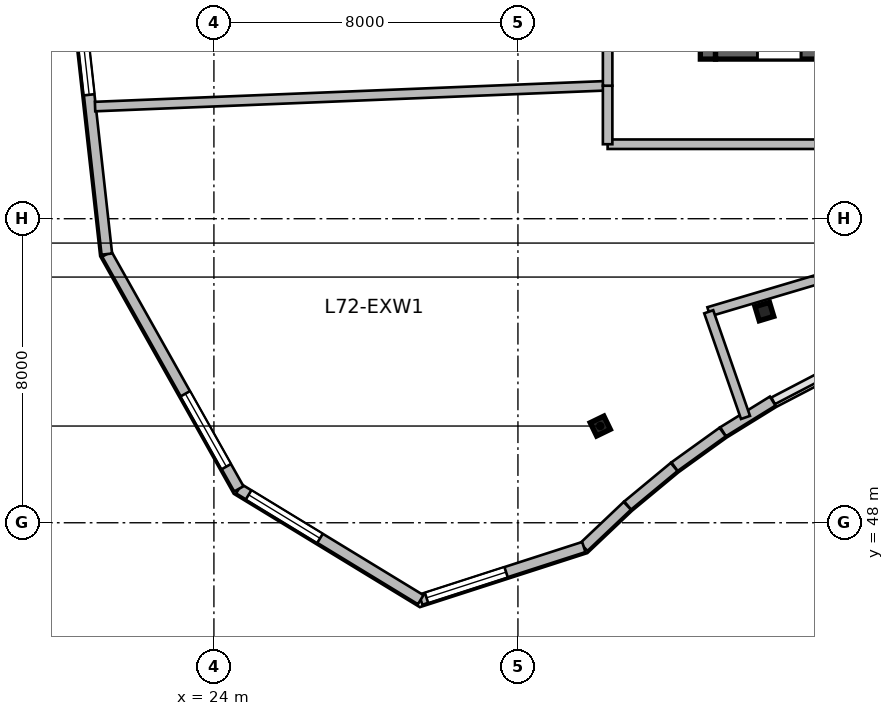
"""IFC4 building model, lengths in metres.
Left out: names, types, materials, properties, quantities, classifications, styles, units other than length and angle.
Written with IfcOpenShell. Run it as: python <this file> out.ifc"""

import sys

from ifc_helpers import new_model, si_unit, direction, frame, frame_2d, origin, origin_2d, place, context, subcontext, project, spatial, rectangle, i_section, extrude, source, transform, mapped, element, fill, save


model = new_model("IFC4")
c1 = context("Model", 3, precision=1e-05, world=origin(), true_north=direction((0.0, 1.0)))
c2 = subcontext(c1, "Body", "Model", "MODEL_VIEW")
j1 = project(units=[si_unit("LENGTHUNIT", "METRE"), si_unit("PLANEANGLEUNIT", "RADIAN")], contexts=[c1])
p1 = place(None, origin())
s1 = spatial("IfcSite", under=j1, at=p1, CompositionType="ELEMENT")
p2 = place(p1, origin())
s2 = spatial("IfcBuilding", under=s1, at=p2, CompositionType="ELEMENT")
p3 = place(p2, frame((0.0, 0.0, 295.2)))
s3 = spatial("IfcBuildingStorey", under=s2, at=p3, CompositionType="ELEMENT", Elevation=295.2)
m1 = source(origin(), c2, "Body", "SweptSolid", [
    extrude(rectangle(XDim=12.0, YDim=0.4, at=frame_2d((6.0, 0.0))), origin(), (0.0, 0.0, 1.0), 3.9),
])
p4 = place(p3, frame((37.0, 60.2, 0.0), z_axis=(0.0, 0.0, 1.0), x_axis=(0.0, 1.0, 0.0)))
e1 = element("IfcWall", 1, at=p4, inside=s3, PredefinedType="SHEAR", context=c2, shape_type="MappedRepresentation", body=[
    mapped(m1, transform((0.0, 0.0, 0.0), scale=1.0)),
])
m2 = source(origin(), c2, "Body", "SweptSolid", [
    extrude(rectangle(XDim=21.6, YDim=0.4, at=frame_2d((10.8, 0.0))), origin(), (0.0, 0.0, 1.0), 3.9),
])
p5 = place(p3, frame((37.2, 60.4, 0.0), z_axis=(0.0, 0.0, 1.0), x_axis=(1.0, 0.0, 0.0)))
e2 = element("IfcWall", 2, at=p5, inside=s3, PredefinedType="SHEAR", context=c2, shape_type="MappedRepresentation", body=[
    mapped(m2, transform((0.0, 0.0, 0.0), scale=1.0)),
])
p6 = place(p5, frame((1.1, 0.0, 0.0)))
e3 = element("IfcOpeningElement", 3, at=p6, cuts=e2, PredefinedType="OPENING", context=c2, shape_type="SweptSolid", body=[
    extrude(rectangle(XDim=1.15, YDim=2.15, at=frame_2d((0.575, 1.075))), frame((0.0, 0.21, 0.0), z_axis=(0.0, -1.0, 0.0), x_axis=(1.0, 0.0, 0.0)), (0.0, 0.0, 1.0), 0.42),
])
p7 = place(p5, frame((19.5, 0.0, 0.0)))
e4 = element("IfcOpeningElement", 4, at=p7, cuts=e2, PredefinedType="OPENING", context=c2, shape_type="SweptSolid", body=[
    extrude(rectangle(XDim=0.9, YDim=2.1, at=frame_2d((0.45, 1.05))), frame((0.0, 0.21, 0.0), z_axis=(0.0, -1.0, 0.0), x_axis=(1.0, 0.0, 0.0)), (0.0, 0.0, 1.0), 0.42),
])
p8 = place(p5, frame((12.02, 0.0, 0.0)))
e5 = element("IfcOpeningElement", 5, at=p8, cuts=e2, PredefinedType="OPENING", context=c2, shape_type="SweptSolid", body=[
    extrude(rectangle(XDim=1.6, YDim=2.15, at=frame_2d((0.8, 1.075))), frame((0.0, 0.21, 0.0), z_axis=(0.0, -1.0, 0.0), x_axis=(1.0, 0.0, 0.0)), (0.0, 0.0, 1.0), 0.42),
])
m3 = source(origin(), c2, "Body", "SweptSolid", [
    extrude(i_section(OverallWidth=0.399, OverallDepth=0.387, WebThickness=0.021, FlangeThickness=0.033, at=origin_2d()), origin(), (0.0, 0.0, 1.0), 3.9),
])
for number, where, z_axis, x_axis in (
    (6, (34.166, 50.545, 0.0), (0.0, 0.0, 1.0), (-0.436, 0.9, 0.0)),
    (7, (38.485, 53.558, 0.0), (0.0, 0.0, 1.0), (-0.289, 0.957, 0.0)),
):
    element("IfcColumn", number, at=place(p3, frame(where, z_axis=z_axis, x_axis=x_axis)), inside=s3, PredefinedType="COLUMN", context=c2, shape_type="MappedRepresentation", body=[
        mapped(m3, transform((0.0, 0.0, 0.0), scale=1.0)),
    ])
m4 = source(origin(), c2, "Body", "SweptSolid", [
    extrude(rectangle(XDim=1.535, YDim=0.28, at=frame_2d((0.768, 0.0))), origin(), (0.0, 0.0, 1.0), 3.64),
])
p9 = place(p3, frame((38.704, 51.201, 0.0), z_axis=(0.0, 0.0, 1.0), x_axis=(-0.850756173541, -0.525560589449, 0.0)))
e8 = element("IfcWall", 8, at=p9, inside=s3, PredefinedType="SOLIDWALL", context=c2, shape_type="MappedRepresentation", body=[
    mapped(m4, transform((0.0, 0.0, 0.0), scale=1.0)),
])
m5 = source(origin(), c2, "Body", "SweptSolid", [
    extrude(rectangle(XDim=1.561, YDim=0.28, at=frame_2d((0.781, 0.0))), origin(), (0.0, 0.0, 1.0), 3.64),
])
p10 = place(p3, frame((37.387, 50.387, 0.0), z_axis=(0.0, 0.0, 1.0), x_axis=(-0.81154027425, -0.584296485758, 0.0)))
e9 = element("IfcWall", 9, at=p10, inside=s3, PredefinedType="SOLIDWALL", context=c2, shape_type="MappedRepresentation", body=[
    mapped(m5, transform((0.0, 0.0, 0.0), scale=1.0)),
])
m6 = source(origin(), c2, "Body", "SweptSolid", [
    extrude(rectangle(XDim=1.589, YDim=0.28, at=frame_2d((0.794, 0.0))), origin(), (0.0, 0.0, 1.0), 3.64),
])
p11 = place(p3, frame((36.11, 49.468, 0.0), z_axis=(0.0, 0.0, 1.0), x_axis=(-0.769805836273, -0.63827813251, 0.0)))
e10 = element("IfcWall", 10, at=p11, inside=s3, PredefinedType="SOLIDWALL", context=c2, shape_type="MappedRepresentation", body=[
    mapped(m6, transform((0.0, 0.0, 0.0), scale=1.0)),
])
m7 = source(origin(), c2, "Body", "SweptSolid", [
    extrude(rectangle(XDim=1.577, YDim=0.28, at=frame_2d((0.789, 0.0))), origin(), (0.0, 0.0, 1.0), 3.64),
])
p12 = place(p3, frame((34.878, 48.446, 0.0), z_axis=(0.0, 0.0, 1.0), x_axis=(-0.726119464467, -0.687568558998, 0.0)))
e11 = element("IfcWall", 11, at=p12, inside=s3, PredefinedType="SOLIDWALL", context=c2, shape_type="MappedRepresentation", body=[
    mapped(m7, transform((0.0, 0.0, 0.0), scale=1.0)),
])
m8 = source(origin(), c2, "Body", "SweptSolid", [
    extrude(rectangle(XDim=4.509, YDim=0.28, at=frame_2d((2.255, 0.0))), origin(), (0.0, 0.0, 1.0), 3.64),
])
p13 = place(p3, frame((33.733, 47.361, 0.0), z_axis=(0.0, 0.0, 1.0), x_axis=(-0.95162949292, -0.307247958828, 0.0)))
e12 = element("IfcWall", 12, at=p13, inside=s3, PredefinedType="SOLIDWALL", context=c2, shape_type="MappedRepresentation", body=[
    mapped(m8, transform((0.0, 0.0, 0.0), scale=1.0)),
])
p14 = place(p13, frame((2.149, 0.0, 0.95)))
e13 = element("IfcOpeningElement", 13, at=p14, cuts=e12, PredefinedType="OPENING", context=c2, shape_type="SweptSolid", body=[
    extrude(rectangle(XDim=2.2, YDim=2.1, at=frame_2d((1.1, 1.05))), frame((0.0, 0.15, 0.0), z_axis=(0.0, -1.0, 0.0), x_axis=(1.0, 0.0, 0.0)), (0.0, 0.0, 1.0), 0.3),
])
m9 = source(origin(), c2, "Body", "SweptSolid", [
    extrude(rectangle(XDim=5.604, YDim=0.28, at=frame_2d((2.802, 0.0))), origin(), (0.0, 0.0, 1.0), 3.64),
])
p15 = place(p3, frame((29.442, 45.976, 0.0), z_axis=(0.0, 0.0, 1.0), x_axis=(-0.854002492971, 0.520268913158, 0.0)))
e14 = element("IfcWall", 14, at=p15, inside=s3, PredefinedType="SOLIDWALL", context=c2, shape_type="MappedRepresentation", body=[
    mapped(m9, transform((0.0, 0.0, 0.0), scale=1.0)),
])
p16 = place(p15, frame((3.103, 0.0, 0.95)))
e15 = element("IfcOpeningElement", 15, at=p16, cuts=e14, PredefinedType="OPENING", context=c2, shape_type="SweptSolid", body=[
    extrude(rectangle(XDim=2.2, YDim=2.1, at=frame_2d((1.1, 1.05))), frame((0.0, 0.15, 0.0), z_axis=(0.0, -1.0, 0.0), x_axis=(1.0, 0.0, 0.0)), (0.0, 0.0, 1.0), 0.3),
])
m10 = source(origin(), c2, "Body", "SweptSolid", [
    extrude(rectangle(XDim=7.087, YDim=0.28, at=frame_2d((3.543, 0.0))), origin(), (0.0, 0.0, 1.0), 3.64),
])
p17 = place(p3, frame((24.656, 48.892, 0.0), z_axis=(0.0, 0.0, 1.0), x_axis=(-0.490158199368, 0.871633489256, 0.0)))
e16 = element("IfcWall", 16, at=p17, inside=s3, PredefinedType="SOLIDWALL", context=c2, shape_type="MappedRepresentation", body=[
    mapped(m10, transform((0.0, 0.0, 0.0), scale=1.0)),
])
p18 = place(p17, frame((0.672, 0.0, 0.95)))
e17 = element("IfcOpeningElement", 17, at=p18, cuts=e16, PredefinedType="OPENING", context=c2, shape_type="SweptSolid", body=[
    extrude(rectangle(XDim=2.2, YDim=2.1, at=frame_2d((1.1, 1.05))), frame((0.0, 0.15, 0.0), z_axis=(0.0, -1.0, 0.0), x_axis=(1.0, 0.0, 0.0)), (0.0, 0.0, 1.0), 0.3),
])
m11 = source(origin(), c2, "Body", "SweptSolid", [
    extrude(rectangle(XDim=7.09, YDim=0.28, at=frame_2d((3.545, 0.0))), origin(), (0.0, 0.0, 1.0), 3.64),
])
p19 = place(p3, frame((21.182, 55.069, 0.0), z_axis=(0.0, 0.0, 1.0), x_axis=(-0.110159396922, 0.993913933532, 0.0)))
e18 = element("IfcWall", 18, at=p19, inside=s3, PredefinedType="SOLIDWALL", context=c2, shape_type="MappedRepresentation", body=[
    mapped(m11, transform((0.0, 0.0, 0.0), scale=1.0)),
])
p20 = place(p19, frame((4.217, 0.0, 0.95)))
e19 = element("IfcOpeningElement", 19, at=p20, cuts=e18, PredefinedType="OPENING", context=c2, shape_type="SweptSolid", body=[
    extrude(rectangle(XDim=2.2, YDim=2.1, at=frame_2d((1.1, 1.05))), frame((0.0, 0.15, 0.0), z_axis=(0.0, -1.0, 0.0), x_axis=(1.0, 0.0, 0.0)), (0.0, 0.0, 1.0), 0.3),
])
m12 = source(origin(), c2, "Body", "SweptSolid", [
    extrude(rectangle(XDim=11.454, YDim=0.25, at=frame_2d((5.727, 0.0))), origin(), (0.0, 0.0, 1.0), 3.314),
])
p21 = place(p3, frame((37.021, 53.552, 0.0), z_axis=(0.0, 0.0, 1.0), x_axis=(0.958594874645, 0.284773359541, 0.0)))
e20 = element("IfcWall", 20, at=p21, inside=s3, PredefinedType="PARTITIONING", context=c2, shape_type="MappedRepresentation", body=[
    mapped(m12, transform((0.0, 0.0, 0.0), scale=1.0)),
])
p22 = place(p21, frame((4.727, 0.0, 0.0)))
e21 = element("IfcOpeningElement", 21, at=p22, cuts=e20, PredefinedType="OPENING", context=c2, shape_type="SweptSolid", body=[
    extrude(rectangle(XDim=1.1, YDim=2.15, at=frame_2d((0.55, 1.075))), frame((0.0, 0.135, 0.0), z_axis=(0.0, -1.0, 0.0), x_axis=(1.0, 0.0, 0.0)), (0.0, 0.0, 1.0), 0.27),
])
m13 = source(origin(), c2, "Body", "SweptSolid", [
    extrude(rectangle(XDim=2.944, YDim=0.25, at=frame_2d((1.472, 0.0))), origin(), (0.0, 0.0, 1.0), 3.64),
])
p23 = place(p3, frame((37.988, 50.771, 0.0), z_axis=(0.0, 0.0, 1.0), x_axis=(-0.328565655286, 0.944481132774, 0.0)))
e22 = element("IfcWall", 22, at=p23, inside=s3, PredefinedType="PARTITIONING", context=c2, shape_type="MappedRepresentation", body=[
    mapped(m13, transform((0.0, 0.0, 0.0), scale=1.0)),
])
m14 = source(origin(), c2, "Body", "SweptSolid", [
    extrude(rectangle(XDim=12.39, YDim=0.25, at=frame_2d((6.195, 0.0))), origin(), (0.0, 0.0, 1.0), 3.64),
])
p24 = place(p3, frame((34.36, 57.96, 0.0), z_axis=(0.0, 0.0, 1.0), x_axis=(1.0, 0.0, 0.0)))
e23 = element("IfcWall", 23, at=p24, inside=s3, PredefinedType="PARTITIONING", context=c2, shape_type="MappedRepresentation", body=[
    mapped(m14, transform((0.0, 0.0, 0.0), scale=1.0)),
])
m15 = source(origin(), c2, "Body", "SweptSolid", [
    extrude(rectangle(XDim=13.499, YDim=0.25, at=frame_2d((6.75, 0.0))), origin(), (0.0, 0.0, 1.0), 3.64),
])
p25 = place(p3, frame((20.872, 58.951, 0.0), z_axis=(0.0, 0.0, 1.0), x_axis=(0.999172424054, 0.04067513995, 0.0)))
e24 = element("IfcWall", 24, at=p25, inside=s3, PredefinedType="PARTITIONING", context=c2, shape_type="MappedRepresentation", body=[
    mapped(m15, transform((0.0, 0.0, 0.0), scale=1.0)),
])
m16 = source(origin(), c2, "Body", "SweptSolid", [
    extrude(rectangle(XDim=1.54, YDim=0.25, at=frame_2d((0.77, 0.0))), origin(), (0.0, 0.0, 1.0), 3.64),
])
p26 = place(p3, frame((34.36, 57.96, 0.0), z_axis=(0.0, 0.0, 1.0), x_axis=(0.0, 1.0, 0.0)))
e25 = element("IfcWall", 25, at=p26, inside=s3, PredefinedType="PARTITIONING", context=c2, shape_type="MappedRepresentation", body=[
    mapped(m16, transform((0.0, 0.0, 0.0), scale=1.0)),
])
m17 = source(origin(), c2, "Body", "SweptSolid", [
    extrude(rectangle(XDim=6.0, YDim=0.25, at=frame_2d((3.0, 0.0))), origin(), (0.0, 0.0, 1.0), 3.64),
])
p27 = place(p3, frame((34.36, 59.5, 0.0), z_axis=(0.0, 0.0, 1.0), x_axis=(0.0, 1.0, 0.0)))
e26 = element("IfcWall", 26, at=p27, inside=s3, PredefinedType="PARTITIONING", context=c2, shape_type="MappedRepresentation", body=[
    mapped(m17, transform((0.0, 0.0, 0.0), scale=1.0)),
])
p28 = place(p27, frame((2.45, 0.0, 0.0)))
e27 = element("IfcOpeningElement", 27, at=p28, cuts=e26, PredefinedType="OPENING", context=c2, shape_type="SweptSolid", body=[
    extrude(rectangle(XDim=1.1, YDim=2.15, at=frame_2d((0.55, 1.075))), frame((0.0, 0.135, 0.0), z_axis=(0.0, -1.0, 0.0), x_axis=(1.0, 0.0, 0.0)), (0.0, 0.0, 1.0), 0.27),
])
m18 = source(origin(), c2, "Body", "SweptSolid", [
    extrude(rectangle(XDim=2.2, YDim=2.1, at=frame_2d((1.1, 1.05))), frame((0.0, 0.03, 0.0), z_axis=(0.0, -1.0, 0.0), x_axis=(1.0, 0.0, 0.0)), (0.0, 0.0, 1.0), 0.06),
])
p29 = place(p14, origin())
e28 = element("IfcWindow", 28, at=p29, inside=s3, PartitioningType="TRIPLE_PANEL_VERTICAL", PredefinedType="WINDOW", context=c2, shape_type="MappedRepresentation", body=[
    mapped(m18, transform((0.0, 0.0, 0.0), scale=1.0)),
])
fill(e13, e28)
p30 = place(p16, origin())
e29 = element("IfcWindow", 29, at=p30, inside=s3, PartitioningType="TRIPLE_PANEL_VERTICAL", PredefinedType="WINDOW", context=c2, shape_type="MappedRepresentation", body=[
    mapped(m18, transform((0.0, 0.0, 0.0), scale=1.0)),
])
fill(e15, e29)
p31 = place(p18, origin())
e30 = element("IfcWindow", 30, at=p31, inside=s3, PartitioningType="TRIPLE_PANEL_VERTICAL", PredefinedType="WINDOW", context=c2, shape_type="MappedRepresentation", body=[
    mapped(m18, transform((0.0, 0.0, 0.0), scale=1.0)),
])
fill(e17, e30)
p32 = place(p20, origin())
e31 = element("IfcWindow", 31, at=p32, inside=s3, PartitioningType="TRIPLE_PANEL_VERTICAL", PredefinedType="WINDOW", context=c2, shape_type="MappedRepresentation", body=[
    mapped(m18, transform((0.0, 0.0, 0.0), scale=1.0)),
])
fill(e19, e31)
m19 = source(origin(), c2, "Body", "SweptSolid", [
    extrude(rectangle(XDim=1.15, YDim=2.15, at=frame_2d((0.575, 1.075))), frame((0.0, 0.025, 0.0), z_axis=(0.0, -1.0, 0.0), x_axis=(1.0, 0.0, 0.0)), (0.0, 0.0, 1.0), 0.05),
])
p33 = place(p6, origin())
e32 = element("IfcDoor", 32, at=p33, inside=s3, OperationType="SINGLE_SWING_LEFT", PredefinedType="DOOR", context=c2, shape_type="MappedRepresentation", body=[
    mapped(m19, transform((0.0, 0.0, 0.0), scale=1.0)),
])
fill(e3, e32)
save(model, sys.argv[1])
